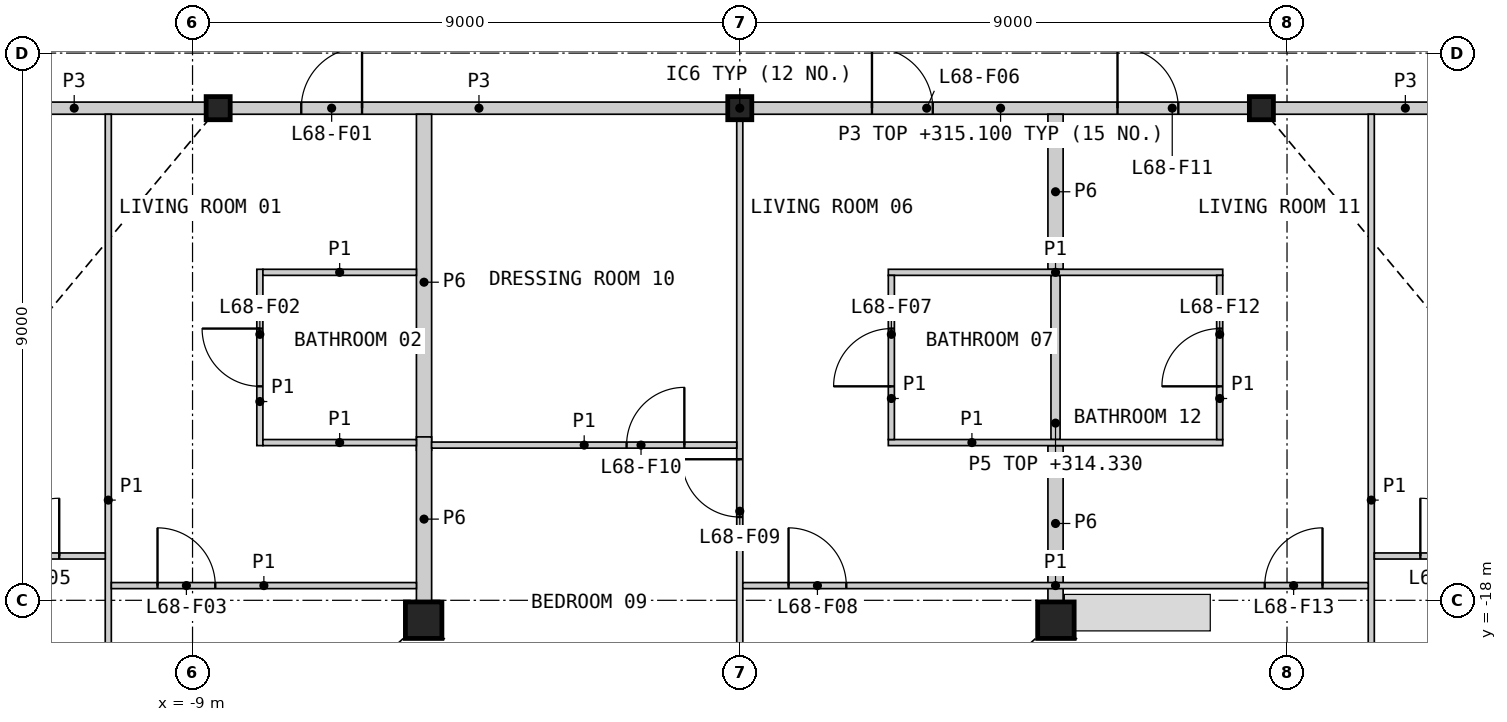
"""IFC4 building model, lengths in metres.
Left out: names, types, materials, properties, quantities, classifications, styles, units other than length and angle.
Written with IfcOpenShell. Run it as: python <this file> out.ifc"""

import sys

from ifc_helpers import new_model, si_unit, direction, frame, frame_2d, origin, origin_2d, place, context, subcontext, project, spatial, rectangle, hollow_rectangle, i_section, extrude, element, fill, save


model = new_model("IFC4")
c1 = context("Model", 3, precision=1e-05, world=origin(), true_north=direction((0.0, 1.0)))
c2 = subcontext(c1, "Body", "Model", "MODEL_VIEW")
j1 = project(units=[si_unit("LENGTHUNIT", "METRE"), si_unit("PLANEANGLEUNIT", "RADIAN")], contexts=[c1])
p1 = place(None, origin())
s1 = spatial("IfcSite", under=j1, at=p1, CompositionType="ELEMENT")
p2 = place(p1, origin())
s2 = spatial("IfcBuilding", under=s1, at=p2, CompositionType="ELEMENT")
p3 = place(p2, frame((0.0, 0.0, 312.0)))
s3 = spatial("IfcBuildingStorey", under=s2, at=p3, CompositionType="ELEMENT", Elevation=312.0)
for number, where, z_axis, x_axis in (
    (1, (-5.199, -18.327, 0.0), (0.0, 0.0, 1.0), (1.0, 0.0, 0.0)),
    (2, (5.199, -18.327, 0.0), (0.0, 0.0, 1.0), (1.0, 0.0, 0.0)),
):
    element("IfcColumn", number, at=place(p3, frame(where, z_axis=z_axis, x_axis=x_axis)), inside=s3, PredefinedType="COLUMN", context=c2, shape_type="SweptSolid", body=[
        extrude(hollow_rectangle(XDim=0.6, YDim=0.6, WallThickness=0.04, at=origin_2d()), origin(), (0.0, 0.0, 1.0), 3.4),
    ])
for number, where, z_axis, x_axis in (
    (3, (-8.578, -9.906, 0.0), (0.0, 0.0, 1.0), (1.0, 0.0, 0.0)),
    (4, (0.0, -9.906, 0.0), (0.0, 0.0, 1.0), (1.0, 0.0, 0.0)),
    (5, (8.578, -9.906, 0.0), (0.0, 0.0, 1.0), (1.0, 0.0, 0.0)),
):
    element("IfcColumn", number, at=place(p3, frame(where, z_axis=z_axis, x_axis=x_axis)), inside=s3, PredefinedType="COLUMN", context=c2, shape_type="SweptSolid", body=[
        extrude(i_section(OverallWidth=0.396, OverallDepth=0.381, WebThickness=0.019, FlangeThickness=0.03, at=origin_2d()), origin(), (0.0, 0.0, 1.0), 3.4),
    ])
p4 = place(p3, frame((0.208, -9.906, 0.0), z_axis=(0.0, 0.0, 1.0), x_axis=(1.0, 0.0, 0.0)))
e6 = element("IfcWall", 6, at=p4, inside=s3, PredefinedType="PARTITIONING", context=c2, shape_type="SweptSolid", body=[
    extrude(rectangle(XDim=8.163, YDim=0.2, at=frame_2d((4.082, 0.0))), origin(), (0.0, 0.0, 1.0), 3.1),
])
p5 = place(p4, frame((1.966, 0.0, 0.0)))
e7 = element("IfcOpeningElement", 7, at=p5, cuts=e6, PredefinedType="OPENING", context=c2, shape_type="SweptSolid", body=[
    extrude(rectangle(XDim=1.0, YDim=2.1, at=frame_2d((0.5, 1.05))), frame((0.0, 0.11, 0.0), z_axis=(0.0, -1.0, 0.0), x_axis=(1.0, 0.0, 0.0)), (0.0, 0.0, 1.0), 0.22),
])
p6 = place(p4, frame((6.004, 0.0, 0.0)))
e8 = element("IfcOpeningElement", 8, at=p6, cuts=e6, PredefinedType="OPENING", context=c2, shape_type="SweptSolid", body=[
    extrude(rectangle(XDim=1.0, YDim=2.1, at=frame_2d((0.5, 1.05))), frame((0.0, 0.11, 0.0), z_axis=(0.0, -1.0, 0.0), x_axis=(1.0, 0.0, 0.0)), (0.0, 0.0, 1.0), 0.22),
])
p7 = place(p3, frame((-8.371, -9.906, 0.0), z_axis=(0.0, 0.0, 1.0), x_axis=(1.0, 0.0, 0.0)))
e9 = element("IfcWall", 9, at=p7, inside=s3, PredefinedType="PARTITIONING", context=c2, shape_type="SweptSolid", body=[
    extrude(rectangle(XDim=8.163, YDim=0.2, at=frame_2d((4.082, 0.0))), origin(), (0.0, 0.0, 1.0), 3.1),
])
p8 = place(p7, frame((1.159, 0.0, 0.0)))
e10 = element("IfcOpeningElement", 10, at=p8, cuts=e9, PredefinedType="OPENING", context=c2, shape_type="SweptSolid", body=[
    extrude(rectangle(XDim=1.0, YDim=2.1, at=frame_2d((0.5, 1.05))), frame((0.0, 0.11, 0.0), z_axis=(0.0, -1.0, 0.0), x_axis=(1.0, 0.0, 0.0)), (0.0, 0.0, 1.0), 0.22),
])
p9 = place(p3, frame((-5.193, -15.531, 0.0), z_axis=(0.0, 0.0, 1.0), x_axis=(0.0, 1.0, 0.0)))
e11 = element("IfcWall", 11, at=p9, inside=s3, PredefinedType="PARTITIONING", context=c2, shape_type="SweptSolid", body=[
    extrude(rectangle(XDim=5.525, YDim=0.25, at=frame_2d((2.762, 0.0))), origin(), (0.0, 0.0, 1.0), 2.33),
])
for number, where, z_axis, x_axis in (
    (12, (-13.106, -9.906, 0.0), (0.0, 0.0, 1.0), (1.0, 0.0, 0.0)),
    (13, (8.786, -9.906, 0.0), (0.0, 0.0, 1.0), (1.0, 0.0, 0.0)),
):
    element("IfcWall", number, at=place(p3, frame(where, z_axis=z_axis, x_axis=x_axis)), inside=s3, PredefinedType="PARTITIONING", context=c2, shape_type="SweptSolid", body=[
        extrude(rectangle(XDim=4.32, YDim=0.2, at=frame_2d((2.16, 0.0))), origin(), (0.0, 0.0, 1.0), 3.1),
    ])
p10 = place(p3, frame((5.193, -12.556, 0.0), z_axis=(0.0, 0.0, 1.0), x_axis=(0.0, 1.0, 0.0)))
e14 = element("IfcWall", 14, at=p10, inside=s3, PredefinedType="PARTITIONING", context=c2, shape_type="SweptSolid", body=[
    extrude(rectangle(XDim=2.55, YDim=0.25, at=frame_2d((1.275, 0.0))), origin(), (0.0, 0.0, 1.0), 2.33),
])
p11 = place(p3, frame((5.193, -18.017, 0.0), z_axis=(0.0, 0.0, 1.0), x_axis=(0.0, 1.0, 0.0)))
e15 = element("IfcWall", 15, at=p11, inside=s3, PredefinedType="PARTITIONING", context=c2, shape_type="SweptSolid", body=[
    extrude(rectangle(XDim=2.561, YDim=0.25, at=frame_2d((1.281, 0.0))), origin(), (0.0, 0.0, 1.0), 2.33),
])
p12 = place(p3, frame((-5.193, -18.017, 0.0), z_axis=(0.0, 0.0, 1.0), x_axis=(0.0, 1.0, 0.0)))
e16 = element("IfcWall", 16, at=p12, inside=s3, PredefinedType="PARTITIONING", context=c2, shape_type="SweptSolid", body=[
    extrude(rectangle(XDim=2.705, YDim=0.25, at=frame_2d((1.352, 0.0))), origin(), (0.0, 0.0, 1.0), 2.33),
])
p13 = place(p3, frame((5.193, -15.356, 0.0), z_axis=(0.0, 0.0, 1.0), x_axis=(0.0, 1.0, 0.0)))
e17 = element("IfcWall", 17, at=p13, inside=s3, PredefinedType="PLUMBINGWALL", context=c2, shape_type="SweptSolid", body=[
    extrude(rectangle(XDim=2.7, YDim=0.15, at=frame_2d((1.35, 0.0))), origin(), (0.0, 0.0, 1.0), 2.33),
])
p14 = place(p3, frame((-10.385, -22.698, 0.0), z_axis=(0.0, 0.0, 1.0), x_axis=(0.0, 1.0, 0.0)))
e18 = element("IfcWall", 18, at=p14, inside=s3, PredefinedType="PARTITIONING", context=c2, shape_type="SweptSolid", body=[
    extrude(rectangle(XDim=12.692, YDim=0.1, at=frame_2d((6.346, 0.0))), origin(), (0.0, 0.0, 1.0), 2.33),
])
p15 = place(p14, frame((1.153, 0.0, 0.0)))
e19 = element("IfcOpeningElement", 19, at=p15, cuts=e18, PredefinedType="OPENING", context=c2, shape_type="SweptSolid", body=[
    extrude(rectangle(XDim=0.95, YDim=2.1, at=frame_2d((0.475, 1.05))), frame((0.0, 0.06, 0.0), z_axis=(0.0, -1.0, 0.0), x_axis=(1.0, 0.0, 0.0)), (0.0, 0.0, 1.0), 0.12),
])
p16 = place(p3, frame((10.385, -22.698, 0.0), z_axis=(0.0, 0.0, 1.0), x_axis=(0.0, 1.0, 0.0)))
e20 = element("IfcWall", 20, at=p16, inside=s3, PredefinedType="PARTITIONING", context=c2, shape_type="SweptSolid", body=[
    extrude(rectangle(XDim=12.692, YDim=0.1, at=frame_2d((6.346, 0.0))), origin(), (0.0, 0.0, 1.0), 2.33),
])
p17 = place(p16, frame((1.153, 0.0, 0.0)))
e21 = element("IfcOpeningElement", 21, at=p17, cuts=e20, PredefinedType="OPENING", context=c2, shape_type="SweptSolid", body=[
    extrude(rectangle(XDim=0.95, YDim=2.1, at=frame_2d((0.475, 1.05))), frame((0.0, 0.06, 0.0), z_axis=(0.0, -1.0, 0.0), x_axis=(1.0, 0.0, 0.0)), (0.0, 0.0, 1.0), 0.12),
])
p18 = place(p3, frame((0.0, -22.698, 0.0), z_axis=(0.0, 0.0, 1.0), x_axis=(0.0, 1.0, 0.0)))
e22 = element("IfcWall", 22, at=p18, inside=s3, PredefinedType="PARTITIONING", context=c2, shape_type="SweptSolid", body=[
    extrude(rectangle(XDim=12.585, YDim=0.1, at=frame_2d((6.292, 0.0))), origin(), (0.0, 0.0, 1.0), 2.33),
])
p19 = place(p18, frame((6.068, 0.0, 0.0)))
e23 = element("IfcOpeningElement", 23, at=p19, cuts=e22, PredefinedType="OPENING", context=c2, shape_type="SweptSolid", body=[
    extrude(rectangle(XDim=0.95, YDim=2.1, at=frame_2d((0.475, 1.05))), frame((0.0, 0.06, 0.0), z_axis=(0.0, -1.0, 0.0), x_axis=(1.0, 0.0, 0.0)), (0.0, 0.0, 1.0), 0.12),
])
p20 = place(p3, frame((0.05, -17.758, 0.0), z_axis=(0.0, 0.0, 1.0), x_axis=(1.0, 0.0, 0.0)))
e24 = element("IfcWall", 24, at=p20, inside=s3, PredefinedType="PARTITIONING", context=c2, shape_type="SweptSolid", body=[
    extrude(rectangle(XDim=10.286, YDim=0.1, at=frame_2d((5.143, 0.0))), origin(), (0.0, 0.0, 1.0), 2.33),
])
p21 = place(p20, frame((0.752, 0.0, 0.0)))
e25 = element("IfcOpeningElement", 25, at=p21, cuts=e24, PredefinedType="OPENING", context=c2, shape_type="SweptSolid", body=[
    extrude(rectangle(XDim=0.95, YDim=2.1, at=frame_2d((0.475, 1.05))), frame((0.0, 0.06, 0.0), z_axis=(0.0, -1.0, 0.0), x_axis=(1.0, 0.0, 0.0)), (0.0, 0.0, 1.0), 0.12),
])
p22 = place(p20, frame((8.584, 0.0, 0.0)))
e26 = element("IfcOpeningElement", 26, at=p22, cuts=e24, PredefinedType="OPENING", context=c2, shape_type="SweptSolid", body=[
    extrude(rectangle(XDim=0.95, YDim=2.1, at=frame_2d((0.475, 1.05))), frame((0.0, 0.06, 0.0), z_axis=(0.0, -1.0, 0.0), x_axis=(1.0, 0.0, 0.0)), (0.0, 0.0, 1.0), 0.12),
])
p23 = place(p3, frame((-17.158, -17.271, 0.0), z_axis=(0.0, 0.0, 1.0), x_axis=(1.0, 0.0, 0.0)))
e27 = element("IfcWall", 27, at=p23, inside=s3, PredefinedType="PARTITIONING", context=c2, shape_type="SweptSolid", body=[
    extrude(rectangle(XDim=6.722, YDim=0.1, at=frame_2d((3.361, 0.0))), origin(), (0.0, 0.0, 1.0), 2.33),
])
p24 = place(p23, frame((5.015, 0.0, 0.0)))
e28 = element("IfcOpeningElement", 28, at=p24, cuts=e27, PredefinedType="OPENING", context=c2, shape_type="SweptSolid", body=[
    extrude(rectangle(XDim=0.95, YDim=2.1, at=frame_2d((0.475, 1.05))), frame((0.0, 0.06, 0.0), z_axis=(0.0, -1.0, 0.0), x_axis=(1.0, 0.0, 0.0)), (0.0, 0.0, 1.0), 0.12),
])
p25 = place(p3, frame((10.436, -17.271, 0.0), z_axis=(0.0, 0.0, 1.0), x_axis=(1.0, 0.0, 0.0)))
e29 = element("IfcWall", 29, at=p25, inside=s3, PredefinedType="PARTITIONING", context=c2, shape_type="SweptSolid", body=[
    extrude(rectangle(XDim=6.722, YDim=0.1, at=frame_2d((3.361, 0.0))), origin(), (0.0, 0.0, 1.0), 2.33),
])
p26 = place(p25, frame((0.757, 0.0, 0.0)))
e30 = element("IfcOpeningElement", 30, at=p26, cuts=e29, PredefinedType="OPENING", context=c2, shape_type="SweptSolid", body=[
    extrude(rectangle(XDim=0.95, YDim=2.1, at=frame_2d((0.475, 1.05))), frame((0.0, 0.06, 0.0), z_axis=(0.0, -1.0, 0.0), x_axis=(1.0, 0.0, 0.0)), (0.0, 0.0, 1.0), 0.12),
])
for number, where, z_axis, x_axis in (
    (31, (2.443, -12.606, 0.0), (0.0, 0.0, 1.0), (1.0, 0.0, 0.0)),
    (32, (2.443, -15.406, 0.0), (0.0, 0.0, 1.0), (1.0, 0.0, 0.0)),
):
    element("IfcWall", number, at=place(p3, frame(where, z_axis=z_axis, x_axis=x_axis)), inside=s3, PredefinedType="PARTITIONING", context=c2, shape_type="SweptSolid", body=[
        extrude(rectangle(XDim=5.5, YDim=0.1, at=frame_2d((2.75, 0.0))), origin(), (0.0, 0.0, 1.0), 2.33),
    ])
p27 = place(p3, frame((-10.336, -17.758, 0.0), z_axis=(0.0, 0.0, 1.0), x_axis=(1.0, 0.0, 0.0)))
e33 = element("IfcWall", 33, at=p27, inside=s3, PredefinedType="PARTITIONING", context=c2, shape_type="SweptSolid", body=[
    extrude(rectangle(XDim=5.018, YDim=0.1, at=frame_2d((2.509, 0.0))), origin(), (0.0, 0.0, 1.0), 2.33),
])
p28 = place(p27, frame((0.76, 0.0, 0.0)))
e34 = element("IfcOpeningElement", 34, at=p28, cuts=e33, PredefinedType="OPENING", context=c2, shape_type="SweptSolid", body=[
    extrude(rectangle(XDim=0.95, YDim=2.1, at=frame_2d((0.475, 1.05))), frame((0.0, 0.06, 0.0), z_axis=(0.0, -1.0, 0.0), x_axis=(1.0, 0.0, 0.0)), (0.0, 0.0, 1.0), 0.12),
])
p29 = place(p3, frame((-5.068, -15.447, 0.0), z_axis=(0.0, 0.0, 1.0), x_axis=(1.0, 0.0, 0.0)))
e35 = element("IfcWall", 35, at=p29, inside=s3, PredefinedType="PARTITIONING", context=c2, shape_type="SweptSolid", body=[
    extrude(rectangle(XDim=5.018, YDim=0.1, at=frame_2d((2.509, 0.0))), origin(), (0.0, 0.0, 1.0), 2.33),
])
p30 = place(p29, frame((3.206, 0.0, 0.0)))
e36 = element("IfcOpeningElement", 36, at=p30, cuts=e35, PredefinedType="OPENING", context=c2, shape_type="SweptSolid", body=[
    extrude(rectangle(XDim=0.95, YDim=2.1, at=frame_2d((0.475, 1.05))), frame((0.0, 0.06, 0.0), z_axis=(0.0, -1.0, 0.0), x_axis=(1.0, 0.0, 0.0)), (0.0, 0.0, 1.0), 0.12),
])
p31 = place(p3, frame((-7.893, -15.456, 0.0), z_axis=(0.0, 0.0, 1.0), x_axis=(0.0, 1.0, 0.0)))
e37 = element("IfcWall", 37, at=p31, inside=s3, PredefinedType="PARTITIONING", context=c2, shape_type="SweptSolid", body=[
    extrude(rectangle(XDim=2.9, YDim=0.1, at=frame_2d((1.45, 0.0))), origin(), (0.0, 0.0, 1.0), 2.33),
])
p32 = place(p31, frame((0.975, 0.0, 0.0)))
e38 = element("IfcOpeningElement", 38, at=p32, cuts=e37, PredefinedType="OPENING", context=c2, shape_type="SweptSolid", body=[
    extrude(rectangle(XDim=0.95, YDim=2.1, at=frame_2d((0.475, 1.05))), frame((0.0, 0.06, 0.0), z_axis=(0.0, -1.0, 0.0), x_axis=(1.0, 0.0, 0.0)), (0.0, 0.0, 1.0), 0.12),
])
p33 = place(p3, frame((2.493, -15.356, 0.0), z_axis=(0.0, 0.0, 1.0), x_axis=(0.0, 1.0, 0.0)))
e39 = element("IfcWall", 39, at=p33, inside=s3, PredefinedType="PARTITIONING", context=c2, shape_type="SweptSolid", body=[
    extrude(rectangle(XDim=2.7, YDim=0.1, at=frame_2d((1.35, 0.0))), origin(), (0.0, 0.0, 1.0), 2.33),
])
p34 = place(p33, frame((0.875, 0.0, 0.0)))
e40 = element("IfcOpeningElement", 40, at=p34, cuts=e39, PredefinedType="OPENING", context=c2, shape_type="SweptSolid", body=[
    extrude(rectangle(XDim=0.95, YDim=2.1, at=frame_2d((0.475, 1.05))), frame((0.0, 0.06, 0.0), z_axis=(0.0, -1.0, 0.0), x_axis=(1.0, 0.0, 0.0)), (0.0, 0.0, 1.0), 0.12),
])
p35 = place(p3, frame((7.893, -15.356, 0.0), z_axis=(0.0, 0.0, 1.0), x_axis=(0.0, 1.0, 0.0)))
e41 = element("IfcWall", 41, at=p35, inside=s3, PredefinedType="PARTITIONING", context=c2, shape_type="SweptSolid", body=[
    extrude(rectangle(XDim=2.7, YDim=0.1, at=frame_2d((1.35, 0.0))), origin(), (0.0, 0.0, 1.0), 2.33),
])
p36 = place(p35, frame((0.875, 0.0, 0.0)))
e42 = element("IfcOpeningElement", 42, at=p36, cuts=e41, PredefinedType="OPENING", context=c2, shape_type="SweptSolid", body=[
    extrude(rectangle(XDim=0.95, YDim=2.1, at=frame_2d((0.475, 1.05))), frame((0.0, 0.06, 0.0), z_axis=(0.0, -1.0, 0.0), x_axis=(1.0, 0.0, 0.0)), (0.0, 0.0, 1.0), 0.12),
])
for number, where, z_axis, x_axis in (
    (43, (-7.843, -12.606, 0.0), (0.0, 0.0, 1.0), (1.0, 0.0, 0.0)),
    (44, (-7.843, -15.406, 0.0), (0.0, 0.0, 1.0), (1.0, 0.0, 0.0)),
):
    element("IfcWall", number, at=place(p3, frame(where, z_axis=z_axis, x_axis=x_axis)), inside=s3, PredefinedType="PARTITIONING", context=c2, shape_type="SweptSolid", body=[
        extrude(rectangle(XDim=2.525, YDim=0.1, at=frame_2d((1.262, 0.0))), origin(), (0.0, 0.0, 1.0), 2.33),
    ])
p37 = place(p8, origin())
e45 = element("IfcDoor", 45, at=p37, inside=s3, OperationType="SINGLE_SWING_RIGHT", PredefinedType="DOOR", context=c2, shape_type="SweptSolid", body=[
    extrude(rectangle(XDim=1.0, YDim=2.1, at=frame_2d((0.5, 1.05))), frame((0.0, 0.025, 0.0), z_axis=(0.0, -1.0, 0.0), x_axis=(1.0, 0.0, 0.0)), (0.0, 0.0, 1.0), 0.05),
])
fill(e10, e45)
p38 = place(p32, origin())
e46 = element("IfcDoor", 46, at=p38, inside=s3, OperationType="SINGLE_SWING_RIGHT", PredefinedType="DOOR", context=c2, shape_type="SweptSolid", body=[
    extrude(rectangle(XDim=0.95, YDim=2.1, at=frame_2d((0.475, 1.05))), frame((0.0, 0.025, 0.0), z_axis=(0.0, -1.0, 0.0), x_axis=(1.0, 0.0, 0.0)), (0.0, 0.0, 1.0), 0.05),
])
fill(e38, e46)
p39 = place(p28, origin())
e47 = element("IfcDoor", 47, at=p39, inside=s3, OperationType="SINGLE_SWING_LEFT", PredefinedType="DOOR", context=c2, shape_type="SweptSolid", body=[
    extrude(rectangle(XDim=0.95, YDim=2.1, at=frame_2d((0.475, 1.05))), frame((0.0, 0.025, 0.0), z_axis=(0.0, -1.0, 0.0), x_axis=(1.0, 0.0, 0.0)), (0.0, 0.0, 1.0), 0.05),
])
fill(e34, e47)
p40 = place(p24, origin())
e48 = element("IfcDoor", 48, at=p40, inside=s3, OperationType="SINGLE_SWING_RIGHT", PredefinedType="DOOR", context=c2, shape_type="SweptSolid", body=[
    extrude(rectangle(XDim=0.95, YDim=2.1, at=frame_2d((0.475, 1.05))), frame((0.0, 0.025, 0.0), z_axis=(0.0, -1.0, 0.0), x_axis=(1.0, 0.0, 0.0)), (0.0, 0.0, 1.0), 0.05),
])
fill(e28, e48)
p41 = place(p5, origin())
e49 = element("IfcDoor", 49, at=p41, inside=s3, OperationType="SINGLE_SWING_LEFT", PredefinedType="DOOR", context=c2, shape_type="SweptSolid", body=[
    extrude(rectangle(XDim=1.0, YDim=2.1, at=frame_2d((0.5, 1.05))), frame((0.0, 0.025, 0.0), z_axis=(0.0, -1.0, 0.0), x_axis=(1.0, 0.0, 0.0)), (0.0, 0.0, 1.0), 0.05),
])
fill(e7, e49)
p42 = place(p34, origin())
e50 = element("IfcDoor", 50, at=p42, inside=s3, OperationType="SINGLE_SWING_LEFT", PredefinedType="DOOR", context=c2, shape_type="SweptSolid", body=[
    extrude(rectangle(XDim=0.95, YDim=2.1, at=frame_2d((0.475, 1.05))), frame((0.0, 0.025, 0.0), z_axis=(0.0, -1.0, 0.0), x_axis=(1.0, 0.0, 0.0)), (0.0, 0.0, 1.0), 0.05),
])
fill(e40, e50)
p43 = place(p21, origin())
e51 = element("IfcDoor", 51, at=p43, inside=s3, OperationType="SINGLE_SWING_LEFT", PredefinedType="DOOR", context=c2, shape_type="SweptSolid", body=[
    extrude(rectangle(XDim=0.95, YDim=2.1, at=frame_2d((0.475, 1.05))), frame((0.0, 0.025, 0.0), z_axis=(0.0, -1.0, 0.0), x_axis=(1.0, 0.0, 0.0)), (0.0, 0.0, 1.0), 0.05),
])
fill(e25, e51)
p44 = place(p19, origin())
e52 = element("IfcDoor", 52, at=p44, inside=s3, OperationType="SINGLE_SWING_RIGHT", PredefinedType="DOOR", context=c2, shape_type="SweptSolid", body=[
    extrude(rectangle(XDim=0.95, YDim=2.1, at=frame_2d((0.475, 1.05))), frame((0.0, 0.025, 0.0), z_axis=(0.0, -1.0, 0.0), x_axis=(1.0, 0.0, 0.0)), (0.0, 0.0, 1.0), 0.05),
])
fill(e23, e52)
p45 = place(p30, origin())
e53 = element("IfcDoor", 53, at=p45, inside=s3, OperationType="SINGLE_SWING_RIGHT", PredefinedType="DOOR", context=c2, shape_type="SweptSolid", body=[
    extrude(rectangle(XDim=0.95, YDim=2.1, at=frame_2d((0.475, 1.05))), frame((0.0, 0.025, 0.0), z_axis=(0.0, -1.0, 0.0), x_axis=(1.0, 0.0, 0.0)), (0.0, 0.0, 1.0), 0.05),
])
fill(e36, e53)
p46 = place(p6, origin())
e54 = element("IfcDoor", 54, at=p46, inside=s3, OperationType="SINGLE_SWING_LEFT", PredefinedType="DOOR", context=c2, shape_type="SweptSolid", body=[
    extrude(rectangle(XDim=1.0, YDim=2.1, at=frame_2d((0.5, 1.05))), frame((0.0, 0.025, 0.0), z_axis=(0.0, -1.0, 0.0), x_axis=(1.0, 0.0, 0.0)), (0.0, 0.0, 1.0), 0.05),
])
fill(e8, e54)
p47 = place(p36, origin())
e55 = element("IfcDoor", 55, at=p47, inside=s3, OperationType="SINGLE_SWING_LEFT", PredefinedType="DOOR", context=c2, shape_type="SweptSolid", body=[
    extrude(rectangle(XDim=0.95, YDim=2.1, at=frame_2d((0.475, 1.05))), frame((0.0, 0.025, 0.0), z_axis=(0.0, -1.0, 0.0), x_axis=(1.0, 0.0, 0.0)), (0.0, 0.0, 1.0), 0.05),
])
fill(e42, e55)
p48 = place(p22, origin())
e56 = element("IfcDoor", 56, at=p48, inside=s3, OperationType="SINGLE_SWING_RIGHT", PredefinedType="DOOR", context=c2, shape_type="SweptSolid", body=[
    extrude(rectangle(XDim=0.95, YDim=2.1, at=frame_2d((0.475, 1.05))), frame((0.0, 0.025, 0.0), z_axis=(0.0, -1.0, 0.0), x_axis=(1.0, 0.0, 0.0)), (0.0, 0.0, 1.0), 0.05),
])
fill(e26, e56)
p49 = place(p26, origin())
e57 = element("IfcDoor", 57, at=p49, inside=s3, OperationType="SINGLE_SWING_LEFT", PredefinedType="DOOR", context=c2, shape_type="SweptSolid", body=[
    extrude(rectangle(XDim=0.95, YDim=2.1, at=frame_2d((0.475, 1.05))), frame((0.0, 0.025, 0.0), z_axis=(0.0, -1.0, 0.0), x_axis=(1.0, 0.0, 0.0)), (0.0, 0.0, 1.0), 0.05),
])
fill(e30, e57)
save(model, sys.argv[1])
